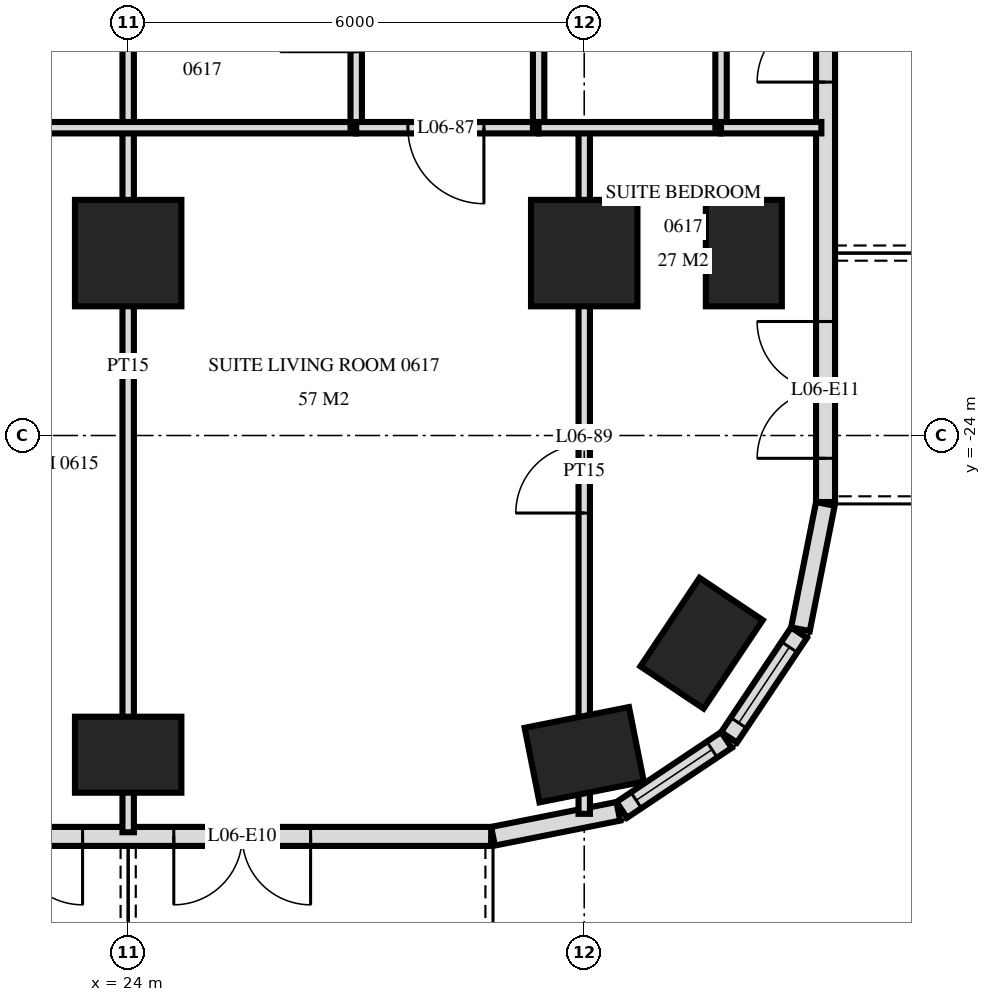
"""IFC4 building model, lengths in metres.
Left out: names, types, materials, properties, quantities, classifications, styles, units other than length and angle.
Written with IfcOpenShell. Run it as: python <this file> out.ifc"""

import sys

from ifc_helpers import new_model, si_unit, direction, frame, frame_2d, origin, origin_2d, place, context, subcontext, project, spatial, rectangle, extrude, element, fill, save


model = new_model("IFC4")
c1 = context("Model", 3, precision=1e-05, world=origin(), true_north=direction((0.0, 1.0)))
c2 = subcontext(c1, "Body", "Model", "MODEL_VIEW")
j1 = project(units=[si_unit("LENGTHUNIT", "METRE"), si_unit("PLANEANGLEUNIT", "RADIAN")], contexts=[c1])
p1 = place(None, origin())
s1 = spatial("IfcSite", under=j1, at=p1, CompositionType="ELEMENT")
p2 = place(p1, origin())
s2 = spatial("IfcBuilding", under=s1, at=p2, CompositionType="ELEMENT")
p3 = place(p2, frame((0.0, 0.0, 31.2)))
s3 = spatial("IfcBuildingStorey", under=s2, at=p3, CompositionType="ELEMENT", Elevation=31.2)
p4 = place(p3, frame((24.0, -28.2, 0.0), z_axis=(0.0, 0.0, 1.0), x_axis=(1.0, 0.0, 0.0)))
e1 = element("IfcColumn", 1, at=p4, inside=s3, PredefinedType="COLUMN", context=c2, shape_type="SweptSolid", body=[
    extrude(rectangle(XDim=1.4, YDim=1.0, at=origin_2d()), origin(), (0.0, 0.0, 1.0), 3.6),
])
p5 = place(p3, frame((24.0, -21.6, 0.0), z_axis=(0.0, 0.0, 1.0), x_axis=(1.0, 0.0, 0.0)))
e2 = element("IfcColumn", 2, at=p5, inside=s3, PredefinedType="COLUMN", context=c2, shape_type="SweptSolid", body=[
    extrude(rectangle(XDim=1.4, YDim=1.4, at=origin_2d()), origin(), (0.0, 0.0, 1.0), 3.6),
])
p6 = place(p3, frame((30.0, -28.2, 0.0), z_axis=(0.0, 0.0, 1.0), x_axis=(0.980792089743, 0.195056086032, 0.0)))
e3 = element("IfcColumn", 3, at=p6, inside=s3, PredefinedType="COLUMN", context=c2, shape_type="SweptSolid", body=[
    extrude(rectangle(XDim=1.4, YDim=1.0, at=origin_2d()), origin(), (0.0, 0.0, 1.0), 3.6),
])
p7 = place(p3, frame((30.0, -21.6, 0.0), z_axis=(0.0, 0.0, 1.0), x_axis=(1.0, 0.0, 0.0)))
e4 = element("IfcColumn", 4, at=p7, inside=s3, PredefinedType="COLUMN", context=c2, shape_type="SweptSolid", body=[
    extrude(rectangle(XDim=1.4, YDim=1.4, at=origin_2d()), origin(), (0.0, 0.0, 1.0), 3.6),
])
for number, where, z_axis, x_axis in (
    (5, (31.544, -26.733, 0.0), (0.0, 0.0, 1.0), (0.556, 0.831, 0.0)),
    (6, (32.1, -21.6, 0.0), (0.0, 0.0, 1.0), (0.0, 1.0, 0.0)),
):
    element("IfcColumn", number, at=place(p3, frame(where, z_axis=z_axis, x_axis=x_axis)), inside=s3, PredefinedType="COLUMN", context=c2, shape_type="SweptSolid", body=[
        extrude(rectangle(XDim=1.4, YDim=1.0, at=origin_2d()), origin(), (0.0, 0.0, 1.0), 3.6),
    ])
p8 = place(p3, frame((-28.775, -29.275, 0.0), z_axis=(0.0, 0.0, 1.0), x_axis=(1.0, 0.0, 0.0)))
e7 = element("IfcWall", 7, at=p8, inside=s3, PredefinedType="SOLIDWALL", context=c2, shape_type="SweptSolid", body=[
    extrude(rectangle(XDim=57.551, YDim=0.25, at=frame_2d((28.775, 0.0))), origin(), (0.0, 0.0, 1.0), 3.32),
])
p9 = place(p8, frame((0.575, 0.0, 0.0)))
e8 = element("IfcOpeningElement", 8, at=p9, cuts=e7, PredefinedType="OPENING", context=c2, shape_type="SweptSolid", body=[
    extrude(rectangle(XDim=1.8, YDim=2.4, at=frame_2d((0.9, 1.2))), frame((0.0, 0.135, 0.0), z_axis=(0.0, -1.0, 0.0), x_axis=(1.0, 0.0, 0.0)), (0.0, 0.0, 1.0), 0.27),
])
p10 = place(p8, frame((5.375, 0.0, 0.0)))
e9 = element("IfcOpeningElement", 9, at=p10, cuts=e7, PredefinedType="OPENING", context=c2, shape_type="SweptSolid", body=[
    extrude(rectangle(XDim=1.8, YDim=2.4, at=frame_2d((0.9, 1.2))), frame((0.0, 0.135, 0.0), z_axis=(0.0, -1.0, 0.0), x_axis=(1.0, 0.0, 0.0)), (0.0, 0.0, 1.0), 0.27),
])
p11 = place(p8, frame((8.075, 0.0, 0.3)))
e10 = element("IfcOpeningElement", 10, at=p11, cuts=e7, PredefinedType="OPENING", context=c2, shape_type="SweptSolid", body=[
    extrude(rectangle(XDim=2.4, YDim=2.1, at=frame_2d((1.2, 1.05))), frame((0.0, 0.135, 0.0), z_axis=(0.0, -1.0, 0.0), x_axis=(1.0, 0.0, 0.0)), (0.0, 0.0, 1.0), 0.27),
])
p12 = place(p8, frame((11.375, 0.0, 0.0)))
e11 = element("IfcOpeningElement", 11, at=p12, cuts=e7, PredefinedType="OPENING", context=c2, shape_type="SweptSolid", body=[
    extrude(rectangle(XDim=1.8, YDim=2.4, at=frame_2d((0.9, 1.2))), frame((0.0, 0.135, 0.0), z_axis=(0.0, -1.0, 0.0), x_axis=(1.0, 0.0, 0.0)), (0.0, 0.0, 1.0), 0.27),
])
p13 = place(p8, frame((14.075, 0.0, 0.3)))
e12 = element("IfcOpeningElement", 12, at=p13, cuts=e7, PredefinedType="OPENING", context=c2, shape_type="SweptSolid", body=[
    extrude(rectangle(XDim=2.4, YDim=2.1, at=frame_2d((1.2, 1.05))), frame((0.0, 0.135, 0.0), z_axis=(0.0, -1.0, 0.0), x_axis=(1.0, 0.0, 0.0)), (0.0, 0.0, 1.0), 0.27),
])
p14 = place(p8, frame((17.375, 0.0, 0.0)))
e13 = element("IfcOpeningElement", 13, at=p14, cuts=e7, PredefinedType="OPENING", context=c2, shape_type="SweptSolid", body=[
    extrude(rectangle(XDim=1.8, YDim=2.4, at=frame_2d((0.9, 1.2))), frame((0.0, 0.135, 0.0), z_axis=(0.0, -1.0, 0.0), x_axis=(1.0, 0.0, 0.0)), (0.0, 0.0, 1.0), 0.27),
])
p15 = place(p8, frame((20.075, 0.0, 0.3)))
e14 = element("IfcOpeningElement", 14, at=p15, cuts=e7, PredefinedType="OPENING", context=c2, shape_type="SweptSolid", body=[
    extrude(rectangle(XDim=2.4, YDim=2.1, at=frame_2d((1.2, 1.05))), frame((0.0, 0.135, 0.0), z_axis=(0.0, -1.0, 0.0), x_axis=(1.0, 0.0, 0.0)), (0.0, 0.0, 1.0), 0.27),
])
p16 = place(p8, frame((23.075, 0.0, 0.3)))
e15 = element("IfcOpeningElement", 15, at=p16, cuts=e7, PredefinedType="OPENING", context=c2, shape_type="SweptSolid", body=[
    extrude(rectangle(XDim=2.4, YDim=2.1, at=frame_2d((1.2, 1.05))), frame((0.0, 0.135, 0.0), z_axis=(0.0, -1.0, 0.0), x_axis=(1.0, 0.0, 0.0)), (0.0, 0.0, 1.0), 0.27),
])
p17 = place(p8, frame((26.375, 0.0, 0.0)))
e16 = element("IfcOpeningElement", 16, at=p17, cuts=e7, PredefinedType="OPENING", context=c2, shape_type="SweptSolid", body=[
    extrude(rectangle(XDim=1.8, YDim=2.4, at=frame_2d((0.9, 1.2))), frame((0.0, 0.135, 0.0), z_axis=(0.0, -1.0, 0.0), x_axis=(1.0, 0.0, 0.0)), (0.0, 0.0, 1.0), 0.27),
])
p18 = place(p8, frame((29.375, 0.0, 0.0)))
e17 = element("IfcOpeningElement", 17, at=p18, cuts=e7, PredefinedType="OPENING", context=c2, shape_type="SweptSolid", body=[
    extrude(rectangle(XDim=1.8, YDim=2.4, at=frame_2d((0.9, 1.2))), frame((0.0, 0.135, 0.0), z_axis=(0.0, -1.0, 0.0), x_axis=(1.0, 0.0, 0.0)), (0.0, 0.0, 1.0), 0.27),
])
p19 = place(p8, frame((32.075, 0.0, 0.3)))
e18 = element("IfcOpeningElement", 18, at=p19, cuts=e7, PredefinedType="OPENING", context=c2, shape_type="SweptSolid", body=[
    extrude(rectangle(XDim=2.4, YDim=2.1, at=frame_2d((1.2, 1.05))), frame((0.0, 0.135, 0.0), z_axis=(0.0, -1.0, 0.0), x_axis=(1.0, 0.0, 0.0)), (0.0, 0.0, 1.0), 0.27),
])
p20 = place(p8, frame((35.375, 0.0, 0.0)))
e19 = element("IfcOpeningElement", 19, at=p20, cuts=e7, PredefinedType="OPENING", context=c2, shape_type="SweptSolid", body=[
    extrude(rectangle(XDim=1.8, YDim=2.4, at=frame_2d((0.9, 1.2))), frame((0.0, 0.135, 0.0), z_axis=(0.0, -1.0, 0.0), x_axis=(1.0, 0.0, 0.0)), (0.0, 0.0, 1.0), 0.27),
])
p21 = place(p8, frame((38.075, 0.0, 0.3)))
e20 = element("IfcOpeningElement", 20, at=p21, cuts=e7, PredefinedType="OPENING", context=c2, shape_type="SweptSolid", body=[
    extrude(rectangle(XDim=2.4, YDim=2.1, at=frame_2d((1.2, 1.05))), frame((0.0, 0.135, 0.0), z_axis=(0.0, -1.0, 0.0), x_axis=(1.0, 0.0, 0.0)), (0.0, 0.0, 1.0), 0.27),
])
p22 = place(p8, frame((41.375, 0.0, 0.0)))
e21 = element("IfcOpeningElement", 21, at=p22, cuts=e7, PredefinedType="OPENING", context=c2, shape_type="SweptSolid", body=[
    extrude(rectangle(XDim=1.8, YDim=2.4, at=frame_2d((0.9, 1.2))), frame((0.0, 0.135, 0.0), z_axis=(0.0, -1.0, 0.0), x_axis=(1.0, 0.0, 0.0)), (0.0, 0.0, 1.0), 0.27),
])
p23 = place(p8, frame((44.075, 0.0, 0.3)))
e22 = element("IfcOpeningElement", 22, at=p23, cuts=e7, PredefinedType="OPENING", context=c2, shape_type="SweptSolid", body=[
    extrude(rectangle(XDim=2.4, YDim=2.1, at=frame_2d((1.2, 1.05))), frame((0.0, 0.135, 0.0), z_axis=(0.0, -1.0, 0.0), x_axis=(1.0, 0.0, 0.0)), (0.0, 0.0, 1.0), 0.27),
])
p24 = place(p8, frame((47.075, 0.0, 0.3)))
e23 = element("IfcOpeningElement", 23, at=p24, cuts=e7, PredefinedType="OPENING", context=c2, shape_type="SweptSolid", body=[
    extrude(rectangle(XDim=2.4, YDim=2.1, at=frame_2d((1.2, 1.05))), frame((0.0, 0.135, 0.0), z_axis=(0.0, -1.0, 0.0), x_axis=(1.0, 0.0, 0.0)), (0.0, 0.0, 1.0), 0.27),
])
p25 = place(p8, frame((50.375, 0.0, 0.0)))
e24 = element("IfcOpeningElement", 24, at=p25, cuts=e7, PredefinedType="OPENING", context=c2, shape_type="SweptSolid", body=[
    extrude(rectangle(XDim=1.8, YDim=2.4, at=frame_2d((0.9, 1.2))), frame((0.0, 0.135, 0.0), z_axis=(0.0, -1.0, 0.0), x_axis=(1.0, 0.0, 0.0)), (0.0, 0.0, 1.0), 0.27),
])
p26 = place(p8, frame((53.375, 0.0, 0.0)))
e25 = element("IfcOpeningElement", 25, at=p26, cuts=e7, PredefinedType="OPENING", context=c2, shape_type="SweptSolid", body=[
    extrude(rectangle(XDim=1.8, YDim=2.4, at=frame_2d((0.9, 1.2))), frame((0.0, 0.135, 0.0), z_axis=(0.0, -1.0, 0.0), x_axis=(1.0, 0.0, 0.0)), (0.0, 0.0, 1.0), 0.27),
])
p27 = place(p3, frame((28.8, -29.273, 0.0), z_axis=(0.0, 0.0, 1.0), x_axis=(0.980775640221, 0.19513878023, 0.0)))
e26 = element("IfcWall", 26, at=p27, inside=s3, PredefinedType="SOLIDWALL", context=c2, shape_type="SweptSolid", body=[
    extrude(rectangle(XDim=1.681, YDim=0.25, at=frame_2d((0.841, 0.0))), origin(), (0.0, 0.0, 1.0), 3.32),
])
p28 = place(p3, frame((30.494, -28.926, 0.0), z_axis=(0.0, 0.0, 1.0), x_axis=(0.831482937015, 0.55555029066, 0.0)))
e27 = element("IfcWall", 27, at=p28, inside=s3, PredefinedType="SOLIDWALL", context=c2, shape_type="SweptSolid", body=[
    extrude(rectangle(XDim=1.656, YDim=0.25, at=frame_2d((0.828, 0.0))), origin(), (0.0, 0.0, 1.0), 3.32),
])
p29 = place(p28, frame((0.228, 0.0, 0.9)))
e28 = element("IfcOpeningElement", 28, at=p29, cuts=e27, PredefinedType="OPENING", context=c2, shape_type="SweptSolid", body=[
    extrude(rectangle(XDim=1.2, YDim=1.5, at=frame_2d((0.6, 0.75))), frame((0.0, 0.135, 0.0), z_axis=(0.0, -1.0, 0.0), x_axis=(1.0, 0.0, 0.0)), (0.0, 0.0, 1.0), 0.27),
])
p30 = place(p3, frame((31.906, -27.971, 0.0), z_axis=(0.0, 0.0, 1.0), x_axis=(0.55555029066, 0.831482937015, 0.0)))
e29 = element("IfcWall", 29, at=p30, inside=s3, PredefinedType="SOLIDWALL", context=c2, shape_type="SweptSolid", body=[
    extrude(rectangle(XDim=1.656, YDim=0.25, at=frame_2d((0.828, 0.0))), origin(), (0.0, 0.0, 1.0), 3.32),
])
p31 = place(p30, frame((0.228, 0.0, 0.9)))
e30 = element("IfcOpeningElement", 30, at=p31, cuts=e29, PredefinedType="OPENING", context=c2, shape_type="SweptSolid", body=[
    extrude(rectangle(XDim=1.2, YDim=1.5, at=frame_2d((0.6, 0.75))), frame((0.0, 0.135, 0.0), z_axis=(0.0, -1.0, 0.0), x_axis=(1.0, 0.0, 0.0)), (0.0, 0.0, 1.0), 0.27),
])
p32 = place(p3, frame((32.844, -26.549, 0.0), z_axis=(0.0, 0.0, 1.0), x_axis=(0.195166572128, 0.980770110232, 0.0)))
e31 = element("IfcWall", 31, at=p32, inside=s3, PredefinedType="SOLIDWALL", context=c2, shape_type="SweptSolid", body=[
    extrude(rectangle(XDim=1.681, YDim=0.25, at=frame_2d((0.841, 0.0))), origin(), (0.0, 0.0, 1.0), 3.32),
])
p33 = place(p3, frame((33.175, -24.875, 0.0), z_axis=(0.0, 0.0, 1.0), x_axis=(0.0, 1.0, 0.0)))
e32 = element("IfcWall", 32, at=p33, inside=s3, PredefinedType="SOLIDWALL", context=c2, shape_type="SweptSolid", body=[
    extrude(rectangle(XDim=21.551, YDim=0.25, at=frame_2d((10.775, 0.0))), origin(), (0.0, 0.0, 1.0), 3.32),
])
p34 = place(p33, frame((0.575, 0.0, 0.0)))
e33 = element("IfcOpeningElement", 33, at=p34, cuts=e32, PredefinedType="OPENING", context=c2, shape_type="SweptSolid", body=[
    extrude(rectangle(XDim=1.8, YDim=2.4, at=frame_2d((0.9, 1.2))), frame((0.0, 0.135, 0.0), z_axis=(0.0, -1.0, 0.0), x_axis=(1.0, 0.0, 0.0)), (0.0, 0.0, 1.0), 0.27),
])
p35 = place(p33, frame((5.525, 0.0, 0.0)))
e34 = element("IfcOpeningElement", 34, at=p35, cuts=e32, PredefinedType="OPENING", context=c2, shape_type="SweptSolid", body=[
    extrude(rectangle(XDim=1.8, YDim=2.4, at=frame_2d((0.9, 1.2))), frame((0.0, 0.135, 0.0), z_axis=(0.0, -1.0, 0.0), x_axis=(1.0, 0.0, 0.0)), (0.0, 0.0, 1.0), 0.27),
])
p36 = place(p33, frame((12.725, 0.0, 0.0)))
e35 = element("IfcOpeningElement", 35, at=p36, cuts=e32, PredefinedType="OPENING", context=c2, shape_type="SweptSolid", body=[
    extrude(rectangle(XDim=1.8, YDim=2.4, at=frame_2d((0.9, 1.2))), frame((0.0, 0.135, 0.0), z_axis=(0.0, -1.0, 0.0), x_axis=(1.0, 0.0, 0.0)), (0.0, 0.0, 1.0), 0.27),
])
p37 = place(p3, frame((31.8, -19.95, 0.0), z_axis=(0.0, 0.0, 1.0), x_axis=(0.0, 1.0, 0.0)))
e36 = element("IfcWall", 36, at=p37, inside=s3, PredefinedType="PLUMBINGWALL", context=c2, shape_type="SweptSolid", body=[
    extrude(rectangle(XDim=3.0, YDim=0.15, at=frame_2d((1.5, 0.0))), origin(), (0.0, 0.0, 1.0), 3.32),
])
p38 = place(p37, frame((1.12, 0.0, 0.0)))
e37 = element("IfcOpeningElement", 37, at=p38, cuts=e36, PredefinedType="OPENING", context=c2, shape_type="SweptSolid", body=[
    extrude(rectangle(XDim=0.8, YDim=2.1, at=frame_2d((0.4, 1.05))), frame((0.0, 0.085, 0.0), z_axis=(0.0, -1.0, 0.0), x_axis=(1.0, 0.0, 0.0)), (0.0, 0.0, 1.0), 0.17),
])
p39 = place(p3, frame((30.0, -28.978, 0.0), z_axis=(0.0, 0.0, 1.0), x_axis=(0.0, 1.0, 0.0)))
e38 = element("IfcWall", 38, at=p39, inside=s3, PredefinedType="PARTITIONING", context=c2, shape_type="SweptSolid", body=[
    extrude(rectangle(XDim=9.028, YDim=0.15, at=frame_2d((4.514, 0.0))), origin(), (0.0, 0.0, 1.0), 3.32),
])
p40 = place(p39, frame((3.958, 0.0, 0.0)))
e39 = element("IfcOpeningElement", 39, at=p40, cuts=e38, PredefinedType="OPENING", context=c2, shape_type="SweptSolid", body=[
    extrude(rectangle(XDim=0.9, YDim=2.1, at=frame_2d((0.45, 1.05))), frame((0.0, 0.085, 0.0), z_axis=(0.0, -1.0, 0.0), x_axis=(1.0, 0.0, 0.0)), (0.0, 0.0, 1.0), 0.17),
])
p41 = place(p3, frame((29.4, -19.95, 0.0), z_axis=(0.0, 0.0, 1.0), x_axis=(0.0, 1.0, 0.0)))
e40 = element("IfcWall", 40, at=p41, inside=s3, PredefinedType="PARTITIONING", context=c2, shape_type="SweptSolid", body=[
    extrude(rectangle(XDim=3.0, YDim=0.15, at=frame_2d((1.5, 0.0))), origin(), (0.0, 0.0, 1.0), 3.32),
])
p42 = place(p41, frame((1.02, 0.0, 0.0)))
e41 = element("IfcOpeningElement", 41, at=p42, cuts=e40, PredefinedType="OPENING", context=c2, shape_type="SweptSolid", body=[
    extrude(rectangle(XDim=1.0, YDim=2.1, at=frame_2d((0.5, 1.05))), frame((0.0, 0.085, 0.0), z_axis=(0.0, -1.0, 0.0), x_axis=(1.0, 0.0, 0.0)), (0.0, 0.0, 1.0), 0.17),
])
p43 = place(p3, frame((27.0, -19.95, 0.0), z_axis=(0.0, 0.0, 1.0), x_axis=(0.0, 1.0, 0.0)))
e42 = element("IfcWall", 42, at=p43, inside=s3, PredefinedType="PARTITIONING", context=c2, shape_type="SweptSolid", body=[
    extrude(rectangle(XDim=3.0, YDim=0.15, at=frame_2d((1.5, 0.0))), origin(), (0.0, 0.0, 1.0), 3.32),
])
p44 = place(p43, frame((1.0, 0.0, 0.0)))
e43 = element("IfcOpeningElement", 43, at=p44, cuts=e42, PredefinedType="OPENING", context=c2, shape_type="SweptSolid", body=[
    extrude(rectangle(XDim=1.0, YDim=2.1, at=frame_2d((0.5, 1.05))), frame((0.0, 0.085, 0.0), z_axis=(0.0, -1.0, 0.0), x_axis=(1.0, 0.0, 0.0)), (0.0, 0.0, 1.0), 0.17),
])
p45 = place(p3, frame((24.0, -29.22, 0.0), z_axis=(0.0, 0.0, 1.0), x_axis=(0.0, 1.0, 0.0)))
e44 = element("IfcWall", 44, at=p45, inside=s3, PredefinedType="PARTITIONING", context=c2, shape_type="SweptSolid", body=[
    extrude(rectangle(XDim=12.27, YDim=0.15, at=frame_2d((6.135, 0.0))), origin(), (0.0, 0.0, 1.0), 3.32),
])
p46 = place(p3, frame((27.0, -19.95, 0.0), z_axis=(0.0, 0.0, 1.0), x_axis=(1.0, 0.0, 0.0)))
e45 = element("IfcWall", 45, at=p46, inside=s3, PredefinedType="PARTITIONING", context=c2, shape_type="SweptSolid", body=[
    extrude(rectangle(XDim=2.4, YDim=0.15, at=frame_2d((1.2, 0.0))), origin(), (0.0, 0.0, 1.0), 3.32),
])
p47 = place(p46, frame((0.68, 0.0, 0.0)))
e46 = element("IfcOpeningElement", 46, at=p47, cuts=e45, PredefinedType="OPENING", context=c2, shape_type="SweptSolid", body=[
    extrude(rectangle(XDim=1.0, YDim=2.1, at=frame_2d((0.5, 1.05))), frame((0.0, 0.085, 0.0), z_axis=(0.0, -1.0, 0.0), x_axis=(1.0, 0.0, 0.0)), (0.0, 0.0, 1.0), 0.17),
])
p48 = place(p3, frame((22.3, -19.95, 0.0), z_axis=(0.0, 0.0, 1.0), x_axis=(1.0, 0.0, 0.0)))
e47 = element("IfcWall", 47, at=p48, inside=s3, PredefinedType="PARTITIONING", context=c2, shape_type="SweptSolid", body=[
    extrude(rectangle(XDim=4.7, YDim=0.15, at=frame_2d((2.35, 0.0))), origin(), (0.0, 0.0, 1.0), 3.32),
])
p49 = place(p3, frame((29.4, -19.95, 0.0), z_axis=(0.0, 0.0, 1.0), x_axis=(1.0, 0.0, 0.0)))
e48 = element("IfcWall", 48, at=p49, inside=s3, PredefinedType="PARTITIONING", context=c2, shape_type="SweptSolid", body=[
    extrude(rectangle(XDim=2.4, YDim=0.15, at=frame_2d((1.2, 0.0))), origin(), (0.0, 0.0, 1.0), 3.32),
])
p50 = place(p3, frame((31.8, -19.95, 0.0), z_axis=(0.0, 0.0, 1.0), x_axis=(1.0, 0.0, 0.0)))
e49 = element("IfcWall", 49, at=p50, inside=s3, PredefinedType="PLUMBINGWALL", context=c2, shape_type="SweptSolid", body=[
    extrude(rectangle(XDim=1.32, YDim=0.15, at=frame_2d((0.66, 0.0))), origin(), (0.0, 0.0, 1.0), 3.32),
])
p51 = place(p29, origin())
e50 = element("IfcWindow", 50, at=p51, inside=s3, PartitioningType="SINGLE_PANEL", PredefinedType="WINDOW", context=c2, shape_type="SweptSolid", body=[
    extrude(rectangle(XDim=1.2, YDim=1.5, at=frame_2d((0.6, 0.75))), frame((0.0, 0.03, 0.0), z_axis=(0.0, -1.0, 0.0), x_axis=(1.0, 0.0, 0.0)), (0.0, 0.0, 1.0), 0.06),
])
fill(e28, e50)
p52 = place(p31, origin())
e51 = element("IfcWindow", 51, at=p52, inside=s3, PartitioningType="SINGLE_PANEL", PredefinedType="WINDOW", context=c2, shape_type="SweptSolid", body=[
    extrude(rectangle(XDim=1.2, YDim=1.5, at=frame_2d((0.6, 0.75))), frame((0.0, 0.03, 0.0), z_axis=(0.0, -1.0, 0.0), x_axis=(1.0, 0.0, 0.0)), (0.0, 0.0, 1.0), 0.06),
])
fill(e30, e51)
p53 = place(p25, frame((0.9, 0.0, 0.0), z_axis=(0.0, 0.0, 1.0), x_axis=(-1.0, 0.0, 0.0)))
e52 = element("IfcDoor", 52, at=p53, inside=s3, OperationType="DOUBLE_DOOR_SINGLE_SWING", PredefinedType="DOOR", context=c2, shape_type="SweptSolid", body=[
    extrude(rectangle(XDim=1.8, YDim=2.4, at=frame_2d((0.0, 1.2))), frame((0.0, -0.025, 0.0), z_axis=(0.0, 1.0, 0.0), x_axis=(-1.0, 0.0, 0.0)), (0.0, 0.0, 1.0), 0.05),
])
fill(e24, e52)
p54 = place(p26, frame((0.9, 0.0, 0.0), z_axis=(0.0, 0.0, 1.0), x_axis=(-1.0, 0.0, 0.0)))
e53 = element("IfcDoor", 53, at=p54, inside=s3, OperationType="DOUBLE_DOOR_SINGLE_SWING", PredefinedType="DOOR", context=c2, shape_type="SweptSolid", body=[
    extrude(rectangle(XDim=1.8, YDim=2.4, at=frame_2d((0.0, 1.2))), frame((0.0, -0.025, 0.0), z_axis=(0.0, 1.0, 0.0), x_axis=(-1.0, 0.0, 0.0)), (0.0, 0.0, 1.0), 0.05),
])
fill(e25, e53)
p55 = place(p34, origin())
e54 = element("IfcDoor", 54, at=p55, inside=s3, OperationType="DOUBLE_DOOR_SINGLE_SWING", PredefinedType="DOOR", context=c2, shape_type="SweptSolid", body=[
    extrude(rectangle(XDim=1.8, YDim=2.4, at=frame_2d((0.9, 1.2))), frame((0.0, 0.025, 0.0), z_axis=(0.0, -1.0, 0.0), x_axis=(1.0, 0.0, 0.0)), (0.0, 0.0, 1.0), 0.05),
])
fill(e33, e54)
p56 = place(p35, origin())
e55 = element("IfcDoor", 55, at=p56, inside=s3, OperationType="DOUBLE_DOOR_SINGLE_SWING", PredefinedType="DOOR", context=c2, shape_type="SweptSolid", body=[
    extrude(rectangle(XDim=1.8, YDim=2.4, at=frame_2d((0.9, 1.2))), frame((0.0, 0.025, 0.0), z_axis=(0.0, -1.0, 0.0), x_axis=(1.0, 0.0, 0.0)), (0.0, 0.0, 1.0), 0.05),
])
fill(e34, e55)
p57 = place(p47, frame((0.5, 0.0, 0.0), z_axis=(0.0, 0.0, 1.0), x_axis=(-1.0, 0.0, 0.0)))
e56 = element("IfcDoor", 56, at=p57, inside=s3, OperationType="SINGLE_SWING_RIGHT", PredefinedType="DOOR", context=c2, shape_type="SweptSolid", body=[
    extrude(rectangle(XDim=1.0, YDim=2.1, at=frame_2d((0.0, 1.05))), frame((0.0, -0.025, 0.0), z_axis=(0.0, 1.0, 0.0), x_axis=(-1.0, 0.0, 0.0)), (0.0, 0.0, 1.0), 0.05),
])
fill(e46, e56)
p58 = place(p40, origin())
e57 = element("IfcDoor", 57, at=p58, inside=s3, OperationType="SINGLE_SWING_RIGHT", PredefinedType="DOOR", context=c2, shape_type="SweptSolid", body=[
    extrude(rectangle(XDim=0.9, YDim=2.1, at=frame_2d((0.45, 1.05))), frame((0.0, 0.025, 0.0), z_axis=(0.0, -1.0, 0.0), x_axis=(1.0, 0.0, 0.0)), (0.0, 0.0, 1.0), 0.05),
])
fill(e39, e57)
save(model, sys.argv[1])
